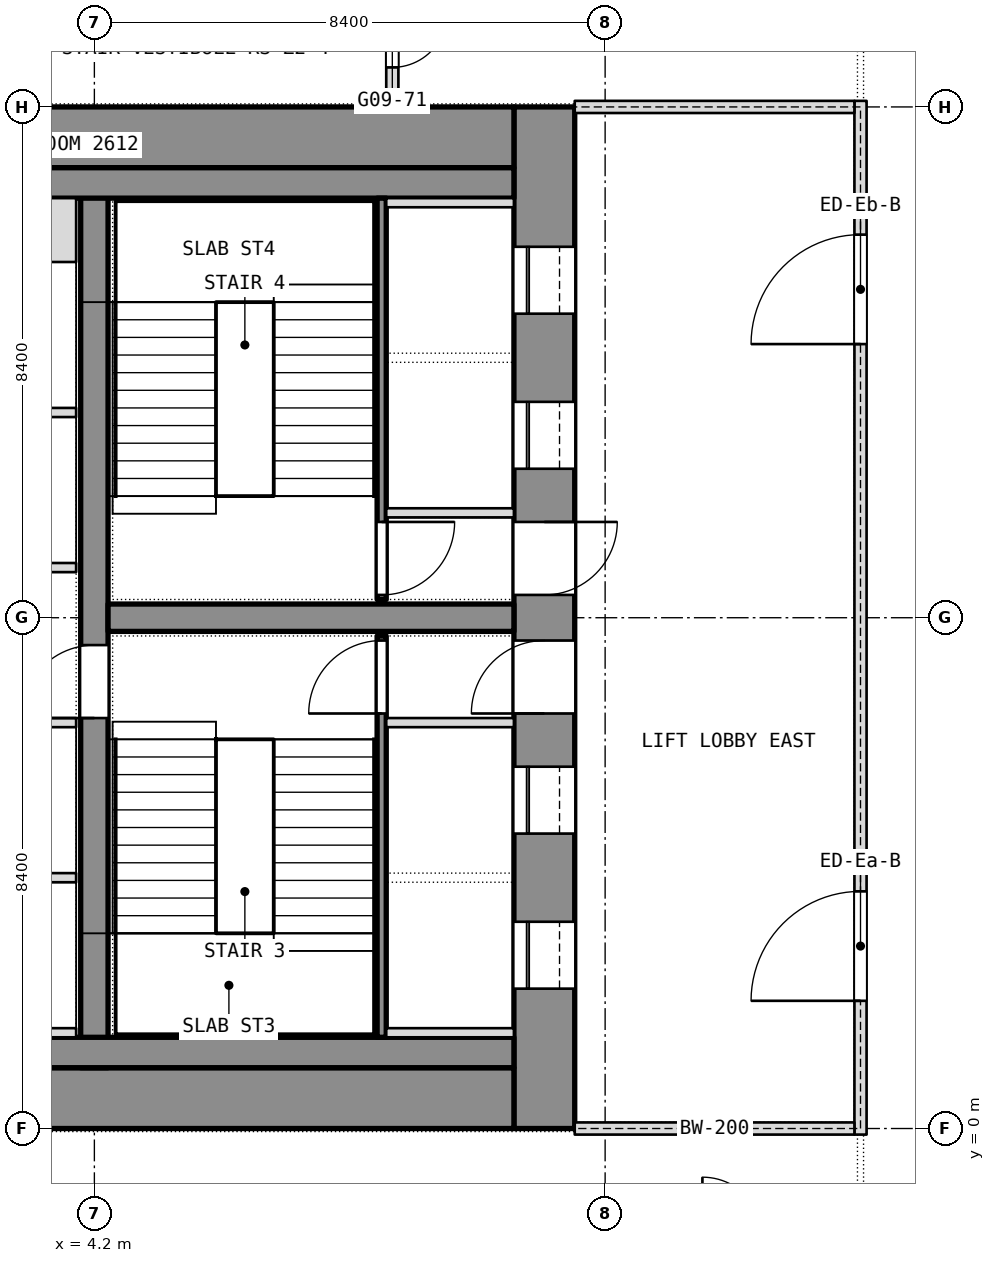
"""IFC4 building model, lengths in metres.
Left out: names, types, materials, properties, quantities, classifications, styles, units other than length and angle.
Written with IfcOpenShell. Run it as: python <this file> out.ifc"""

import sys

from ifc_helpers import new_model, si_unit, direction, frame, frame_2d, origin, place, context, subcontext, project, spatial, rectangle, extrude, element, fill, save


model = new_model("IFC4")
c1 = context("Model", 3, precision=1e-05, world=origin(), true_north=direction((0.0, 1.0)))
c2 = subcontext(c1, "Body", "Model", "MODEL_VIEW")
j1 = project(units=[si_unit("LENGTHUNIT", "METRE"), si_unit("PLANEANGLEUNIT", "RADIAN")], contexts=[c1])
p1 = place(None, origin())
s1 = spatial("IfcSite", under=j1, at=p1, CompositionType="ELEMENT")
p2 = place(p1, origin())
s2 = spatial("IfcBuilding", under=s1, at=p2, CompositionType="ELEMENT")
p3 = place(p2, frame((0.0, 0.0, 119.3)))
s3 = spatial("IfcBuildingStorey", under=s2, at=p3, CompositionType="ELEMENT", Elevation=119.3)
p4 = place(p3, frame((11.6, 0.0, 0.0), z_axis=(0.0, 0.0, 1.0), x_axis=(0.0, 1.0, 0.0)))
e1 = element("IfcWall", 1, at=p4, inside=s3, PredefinedType="SHEAR", context=c2, shape_type="SweptSolid", body=[
    extrude(rectangle(XDim=16.8, YDim=1.0, at=frame_2d((8.4, 0.0))), origin(), (0.0, 0.0, 1.0), 3.6),
])
p5 = place(p4, frame((2.3, 0.0, 0.0)))
e2 = element("IfcOpeningElement", 2, at=p5, cuts=e1, PredefinedType="OPENING", context=c2, shape_type="SweptSolid", body=[
    extrude(rectangle(XDim=1.1, YDim=2.1, at=frame_2d((0.55, 1.05))), frame((0.0, 0.5, 0.0), z_axis=(0.0, -1.0, 0.0), x_axis=(1.0, 0.0, 0.0)), (0.0, 0.0, 1.0), 1.0),
])
p6 = place(p4, frame((4.85, 0.0, 0.0)))
e3 = element("IfcOpeningElement", 3, at=p6, cuts=e1, PredefinedType="OPENING", context=c2, shape_type="SweptSolid", body=[
    extrude(rectangle(XDim=1.1, YDim=2.1, at=frame_2d((0.55, 1.05))), frame((0.0, 0.5, 0.0), z_axis=(0.0, -1.0, 0.0), x_axis=(1.0, 0.0, 0.0)), (0.0, 0.0, 1.0), 1.0),
])
p7 = place(p4, frame((6.825, 0.0, 0.0)))
e4 = element("IfcOpeningElement", 4, at=p7, cuts=e1, PredefinedType="OPENING", context=c2, shape_type="SweptSolid", body=[
    extrude(rectangle(XDim=1.2, YDim=2.1, at=frame_2d((0.6, 1.05))), frame((0.0, 0.5, 0.0), z_axis=(0.0, -1.0, 0.0), x_axis=(1.0, 0.0, 0.0)), (0.0, 0.0, 1.0), 1.0),
])
p8 = place(p4, frame((13.4, 0.0, 0.0)))
e5 = element("IfcOpeningElement", 5, at=p8, cuts=e1, PredefinedType="OPENING", context=c2, shape_type="SweptSolid", body=[
    extrude(rectangle(XDim=1.1, YDim=2.1, at=frame_2d((0.55, 1.05))), frame((0.0, 0.5, 0.0), z_axis=(0.0, -1.0, 0.0), x_axis=(1.0, 0.0, 0.0)), (0.0, 0.0, 1.0), 1.0),
])
p9 = place(p4, frame((10.85, 0.0, 0.0)))
e6 = element("IfcOpeningElement", 6, at=p9, cuts=e1, PredefinedType="OPENING", context=c2, shape_type="SweptSolid", body=[
    extrude(rectangle(XDim=1.1, YDim=2.1, at=frame_2d((0.55, 1.05))), frame((0.0, 0.5, 0.0), z_axis=(0.0, -1.0, 0.0), x_axis=(1.0, 0.0, 0.0)), (0.0, 0.0, 1.0), 1.0),
])
p10 = place(p4, frame((8.775, 0.0, 0.0)))
e7 = element("IfcOpeningElement", 7, at=p10, cuts=e1, PredefinedType="OPENING", context=c2, shape_type="SweptSolid", body=[
    extrude(rectangle(XDim=1.2, YDim=2.1, at=frame_2d((0.6, 1.05))), frame((0.0, 0.5, 0.0), z_axis=(0.0, -1.0, 0.0), x_axis=(1.0, 0.0, 0.0)), (0.0, 0.0, 1.0), 1.0),
])
for number, where, z_axis, x_axis in (
    (8, (-11.1, 0.5, 0.0), (0.0, 0.0, 1.0), (1.0, 0.0, 0.0)),
    (9, (-11.1, 16.3, 0.0), (0.0, 0.0, 1.0), (1.0, 0.0, 0.0)),
):
    element("IfcWall", number, at=place(p3, frame(where, z_axis=z_axis, x_axis=x_axis)), inside=s3, PredefinedType="SHEAR", context=c2, shape_type="SweptSolid", body=[
        extrude(rectangle(XDim=22.2, YDim=1.0, at=frame_2d((11.1, 0.0))), origin(), (0.0, 0.0, 1.0), 3.6),
    ])
p11 = place(p3, frame((4.2, 1.0, 0.0), z_axis=(0.0, 0.0, 1.0), x_axis=(0.0, 1.0, 0.0)))
e10 = element("IfcWall", 10, at=p11, inside=s3, PredefinedType="SHEAR", context=c2, shape_type="SweptSolid", body=[
    extrude(rectangle(XDim=14.8, YDim=0.45, at=frame_2d((7.4, 0.0))), origin(), (0.0, 0.0, 1.0), 3.6),
])
p12 = place(p11, frame((5.75, 0.0, 0.0)))
e11 = element("IfcOpeningElement", 11, at=p12, cuts=e10, PredefinedType="OPENING", context=c2, shape_type="SweptSolid", body=[
    extrude(rectangle(XDim=1.2, YDim=2.1, at=frame_2d((0.6, 1.05))), frame((0.0, 0.225, 0.0), z_axis=(0.0, -1.0, 0.0), x_axis=(1.0, 0.0, 0.0)), (0.0, 0.0, 1.0), 0.45),
])
p13 = place(p3, frame((4.425, 8.4, 0.0), z_axis=(0.0, 0.0, 1.0), x_axis=(1.0, 0.0, 0.0)))
e12 = element("IfcWall", 12, at=p13, inside=s3, PredefinedType="SHEAR", context=c2, shape_type="SweptSolid", body=[
    extrude(rectangle(XDim=6.675, YDim=0.45, at=frame_2d((3.337, 0.0))), origin(), (0.0, 0.0, 1.0), 3.6),
])
p14 = place(p3, frame((9.1, 16.9, 0.0), z_axis=(0.0, 0.0, 1.0), x_axis=(0.0, 1.0, 0.0)))
e13 = element("IfcWall", 13, at=p14, inside=s3, PredefinedType="PARTITIONING", context=c2, shape_type="SweptSolid", body=[
    extrude(rectangle(XDim=1.8, YDim=0.2, at=frame_2d((0.9, 0.0))), origin(), (0.0, 0.0, 1.0), 3.34),
])
p15 = place(p14, frame((0.55, 0.0, 0.0)))
e14 = element("IfcOpeningElement", 14, at=p15, cuts=e13, PredefinedType="OPENING", context=c2, shape_type="SweptSolid", body=[
    extrude(rectangle(XDim=0.9, YDim=2.1, at=frame_2d((0.45, 1.05))), frame((0.0, 0.1, 0.0), z_axis=(0.0, -1.0, 0.0), x_axis=(1.0, 0.0, 0.0)), (0.0, 0.0, 1.0), 0.2),
])
for number, where, z_axis, x_axis in (
    (15, (-11.1, 1.25, 0.0), (0.0, 0.0, 1.0), (1.0, 0.0, 0.0)),
    (16, (-11.1, 15.55, 0.0), (0.0, 0.0, 1.0), (1.0, 0.0, 0.0)),
):
    element("IfcWall", number, at=place(p3, frame(where, z_axis=z_axis, x_axis=x_axis)), inside=s3, PredefinedType="PARTITIONING", context=c2, shape_type="SweptSolid", body=[
        extrude(rectangle(XDim=22.2, YDim=0.5, at=frame_2d((11.1, 0.0))), origin(), (0.0, 0.0, 1.0), 3.34),
    ])
p16 = place(p3, frame((8.925, 1.5, 0.0), z_axis=(0.0, 0.0, 1.0), x_axis=(0.0, 1.0, 0.0)))
e17 = element("IfcWall", 17, at=p16, inside=s3, PredefinedType="SHEAR", context=c2, shape_type="SweptSolid", body=[
    extrude(rectangle(XDim=6.6, YDim=0.15, at=frame_2d((3.3, 0.0))), origin(), (0.0, 0.0, 1.0), 3.34),
])
p17 = place(p16, frame((5.325, 0.0, 0.0)))
e18 = element("IfcOpeningElement", 18, at=p17, cuts=e17, PredefinedType="OPENING", context=c2, shape_type="SweptSolid", body=[
    extrude(rectangle(XDim=1.2, YDim=2.1, at=frame_2d((0.6, 1.05))), frame((0.0, 0.075, 0.0), z_axis=(0.0, -1.0, 0.0), x_axis=(1.0, 0.0, 0.0)), (0.0, 0.0, 1.0), 0.15),
])
for number, where, z_axis, x_axis in (
    (19, (9.0, 6.675, 0.0), (0.0, 0.0, 1.0), (1.0, 0.0, 0.0)),
    (20, (9.0, 1.575, 0.0), (0.0, 0.0, 1.0), (1.0, 0.0, 0.0)),
):
    element("IfcWall", number, at=place(p3, frame(where, z_axis=z_axis, x_axis=x_axis)), inside=s3, PredefinedType="SHEAR", context=c2, shape_type="SweptSolid", body=[
        extrude(rectangle(XDim=2.1, YDim=0.15, at=frame_2d((1.05, 0.0))), origin(), (0.0, 0.0, 1.0), 3.6),
    ])
p18 = place(p3, frame((8.925, 8.7, 0.0), z_axis=(0.0, 0.0, 1.0), x_axis=(0.0, 1.0, 0.0)))
e21 = element("IfcWall", 21, at=p18, inside=s3, PredefinedType="SHEAR", context=c2, shape_type="SweptSolid", body=[
    extrude(rectangle(XDim=6.6, YDim=0.15, at=frame_2d((3.3, 0.0))), origin(), (0.0, 0.0, 1.0), 3.34),
])
p19 = place(p18, frame((0.075, 0.0, 0.0)))
e22 = element("IfcOpeningElement", 22, at=p19, cuts=e21, PredefinedType="OPENING", context=c2, shape_type="SweptSolid", body=[
    extrude(rectangle(XDim=1.2, YDim=2.1, at=frame_2d((0.6, 1.05))), frame((0.0, 0.075, 0.0), z_axis=(0.0, -1.0, 0.0), x_axis=(1.0, 0.0, 0.0)), (0.0, 0.0, 1.0), 0.15),
])
for number, where, z_axis, x_axis in (
    (23, (9.0, 10.125, 0.0), (0.0, 0.0, 1.0), (1.0, 0.0, 0.0)),
    (24, (9.0, 15.225, 0.0), (0.0, 0.0, 1.0), (1.0, 0.0, 0.0)),
):
    element("IfcWall", number, at=place(p3, frame(where, z_axis=z_axis, x_axis=x_axis)), inside=s3, PredefinedType="SHEAR", context=c2, shape_type="SweptSolid", body=[
        extrude(rectangle(XDim=2.1, YDim=0.15, at=frame_2d((1.05, 0.0))), origin(), (0.0, 0.0, 1.0), 3.6),
    ])
p20 = place(p3, frame((-3.9, 4.125, 0.0), z_axis=(0.0, 0.0, 1.0), x_axis=(1.0, 0.0, 0.0)))
e25 = element("IfcWall", 25, at=p20, inside=s3, PredefinedType="PARTITIONING", context=c2, shape_type="SweptSolid", body=[
    extrude(rectangle(XDim=7.8, YDim=0.15, at=frame_2d((3.9, 0.0))), origin(), (0.0, 0.0, 1.0), 3.34),
])
p21 = place(p20, frame((3.75, 0.0, 0.0)))
e26 = element("IfcOpeningElement", 26, at=p21, cuts=e25, PredefinedType="OPENING", context=c2, shape_type="SweptSolid", body=[
    extrude(rectangle(XDim=1.2, YDim=2.1, at=frame_2d((0.6, 1.05))), frame((0.0, 0.075, 0.0), z_axis=(0.0, -1.0, 0.0), x_axis=(1.0, 0.0, 0.0)), (0.0, 0.0, 1.0), 0.15),
])
p22 = place(p3, frame((-3.9, 11.775, 0.0), z_axis=(0.0, 0.0, 1.0), x_axis=(1.0, 0.0, 0.0)))
e27 = element("IfcWall", 27, at=p22, inside=s3, PredefinedType="PARTITIONING", context=c2, shape_type="SweptSolid", body=[
    extrude(rectangle(XDim=7.8, YDim=0.15, at=frame_2d((3.9, 0.0))), origin(), (0.0, 0.0, 1.0), 3.34),
])
p23 = place(p22, frame((3.3, 0.0, 0.0)))
e28 = element("IfcOpeningElement", 28, at=p23, cuts=e27, PredefinedType="OPENING", context=c2, shape_type="SweptSolid", body=[
    extrude(rectangle(XDim=1.2, YDim=2.1, at=frame_2d((0.6, 1.05))), frame((0.0, 0.075, 0.0), z_axis=(0.0, -1.0, 0.0), x_axis=(1.0, 0.0, 0.0)), (0.0, 0.0, 1.0), 0.15),
])
p24 = place(p3, frame((1.65, 1.575, 0.0), z_axis=(0.0, 0.0, 1.0), x_axis=(1.0, 0.0, 0.0)))
e29 = element("IfcWall", 29, at=p24, inside=s3, PredefinedType="SHEAR", context=c2, shape_type="SweptSolid", body=[
    extrude(rectangle(XDim=2.25, YDim=0.15, at=frame_2d((1.125, 0.0))), origin(), (0.0, 0.0, 1.0), 3.6),
])
p25 = place(p3, frame((1.65, 14.775, 0.0), z_axis=(0.0, 0.0, 1.0), x_axis=(1.0, 0.0, 0.0)))
e30 = element("IfcWall", 30, at=p25, inside=s3, PredefinedType="SHEAR", context=c2, shape_type="SweptSolid", body=[
    extrude(rectangle(XDim=2.25, YDim=1.05, at=frame_2d((1.125, 0.0))), origin(), (0.0, 0.0, 1.0), 3.6),
])
for number, where, z_axis, x_axis in (
    (31, (1.65, 6.675, 0.0), (0.0, 0.0, 1.0), (1.0, 0.0, 0.0)),
    (32, (1.65, 9.225, 0.0), (0.0, 0.0, 1.0), (1.0, 0.0, 0.0)),
):
    element("IfcWall", number, at=place(p3, frame(where, z_axis=z_axis, x_axis=x_axis)), inside=s3, PredefinedType="SHEAR", context=c2, shape_type="SweptSolid", body=[
        extrude(rectangle(XDim=2.25, YDim=0.15, at=frame_2d((1.125, 0.0))), origin(), (0.0, 0.0, 1.0), 3.6),
    ])
p26 = place(p3, frame((16.8, -0.1, 0.0), z_axis=(0.0, 0.0, 1.0), x_axis=(0.0, 1.0, 0.0)))
e33 = element("IfcWall", 33, at=p26, inside=s3, PredefinedType="PARTITIONING", context=c2, shape_type="SweptSolid", body=[
    extrude(rectangle(XDim=17.0, YDim=0.2, at=frame_2d((8.5, 0.0))), origin(), (0.0, 0.0, 1.0), 3.34),
])
p27 = place(p26, frame((2.2, 0.0, 0.0)))
e34 = element("IfcOpeningElement", 34, at=p27, cuts=e33, PredefinedType="OPENING", context=c2, shape_type="SweptSolid", body=[
    extrude(rectangle(XDim=1.8, YDim=2.1, at=frame_2d((0.9, 1.05))), frame((0.0, 0.1, 0.0), z_axis=(0.0, -1.0, 0.0), x_axis=(1.0, 0.0, 0.0)), (0.0, 0.0, 1.0), 0.2),
])
p28 = place(p26, frame((13.0, 0.0, 0.0)))
e35 = element("IfcOpeningElement", 35, at=p28, cuts=e33, PredefinedType="OPENING", context=c2, shape_type="SweptSolid", body=[
    extrude(rectangle(XDim=1.8, YDim=2.1, at=frame_2d((0.9, 1.05))), frame((0.0, 0.1, 0.0), z_axis=(0.0, -1.0, 0.0), x_axis=(1.0, 0.0, 0.0)), (0.0, 0.0, 1.0), 0.2),
])
for number, where, z_axis, x_axis in (
    (36, (12.1, 0.0, 0.0), (0.0, 0.0, 1.0), (1.0, 0.0, 0.0)),
    (37, (12.1, 16.8, 0.0), (0.0, 0.0, 1.0), (1.0, 0.0, 0.0)),
):
    element("IfcWall", number, at=place(p3, frame(where, z_axis=z_axis, x_axis=x_axis)), inside=s3, PredefinedType="PARTITIONING", context=c2, shape_type="SweptSolid", body=[
        extrude(rectangle(XDim=4.6, YDim=0.2, at=frame_2d((2.3, 0.0))), origin(), (0.0, 0.0, 1.0), 2.89),
    ])
p29 = place(p15, origin())
e38 = element("IfcDoor", 38, at=p29, inside=s3, OperationType="SINGLE_SWING_RIGHT", PredefinedType="DOOR", context=c2, shape_type="SweptSolid", body=[
    extrude(rectangle(XDim=0.9, YDim=2.1, at=frame_2d((0.45, 1.05))), frame((0.0, 0.025, 0.0), z_axis=(0.0, -1.0, 0.0), x_axis=(1.0, 0.0, 0.0)), (0.0, 0.0, 1.0), 0.05),
])
fill(e14, e38)
p30 = place(p5, origin())
e39 = element("IfcDoor", 39, at=p30, inside=s3, OperationType="SLIDING_TO_LEFT", PredefinedType="DOOR", context=c2, shape_type="SweptSolid", body=[
    extrude(rectangle(XDim=1.1, YDim=2.1, at=frame_2d((0.55, 1.05))), frame((0.0, 0.025, 0.0), z_axis=(0.0, -1.0, 0.0), x_axis=(1.0, 0.0, 0.0)), (0.0, 0.0, 1.0), 0.05),
])
fill(e2, e39)
p31 = place(p6, origin())
e40 = element("IfcDoor", 40, at=p31, inside=s3, OperationType="SLIDING_TO_LEFT", PredefinedType="DOOR", context=c2, shape_type="SweptSolid", body=[
    extrude(rectangle(XDim=1.1, YDim=2.1, at=frame_2d((0.55, 1.05))), frame((0.0, 0.025, 0.0), z_axis=(0.0, -1.0, 0.0), x_axis=(1.0, 0.0, 0.0)), (0.0, 0.0, 1.0), 0.05),
])
fill(e3, e40)
p32 = place(p7, origin())
e41 = element("IfcDoor", 41, at=p32, inside=s3, OperationType="SINGLE_SWING_LEFT", PredefinedType="DOOR", context=c2, shape_type="SweptSolid", body=[
    extrude(rectangle(XDim=1.2, YDim=2.1, at=frame_2d((0.6, 1.05))), frame((0.0, 0.025, 0.0), z_axis=(0.0, -1.0, 0.0), x_axis=(1.0, 0.0, 0.0)), (0.0, 0.0, 1.0), 0.05),
])
fill(e4, e41)
p33 = place(p17, origin())
e42 = element("IfcDoor", 42, at=p33, inside=s3, OperationType="SINGLE_SWING_LEFT", PredefinedType="DOOR", context=c2, shape_type="SweptSolid", body=[
    extrude(rectangle(XDim=1.2, YDim=2.1, at=frame_2d((0.6, 1.05))), frame((0.0, 0.025, 0.0), z_axis=(0.0, -1.0, 0.0), x_axis=(1.0, 0.0, 0.0)), (0.0, 0.0, 1.0), 0.05),
])
fill(e18, e42)
p34 = place(p8, origin())
e43 = element("IfcDoor", 43, at=p34, inside=s3, OperationType="SLIDING_TO_LEFT", PredefinedType="DOOR", context=c2, shape_type="SweptSolid", body=[
    extrude(rectangle(XDim=1.1, YDim=2.1, at=frame_2d((0.55, 1.05))), frame((0.0, 0.025, 0.0), z_axis=(0.0, -1.0, 0.0), x_axis=(1.0, 0.0, 0.0)), (0.0, 0.0, 1.0), 0.05),
])
fill(e5, e43)
p35 = place(p9, origin())
e44 = element("IfcDoor", 44, at=p35, inside=s3, OperationType="SLIDING_TO_LEFT", PredefinedType="DOOR", context=c2, shape_type="SweptSolid", body=[
    extrude(rectangle(XDim=1.1, YDim=2.1, at=frame_2d((0.55, 1.05))), frame((0.0, 0.025, 0.0), z_axis=(0.0, -1.0, 0.0), x_axis=(1.0, 0.0, 0.0)), (0.0, 0.0, 1.0), 0.05),
])
fill(e6, e44)
p36 = place(p10, origin())
e45 = element("IfcDoor", 45, at=p36, inside=s3, OperationType="SINGLE_SWING_LEFT", PredefinedType="DOOR", context=c2, shape_type="SweptSolid", body=[
    extrude(rectangle(XDim=1.2, YDim=2.1, at=frame_2d((0.6, 1.05))), frame((0.0, 0.025, 0.0), z_axis=(0.0, -1.0, 0.0), x_axis=(1.0, 0.0, 0.0)), (0.0, 0.0, 1.0), 0.05),
])
fill(e7, e45)
p37 = place(p19, origin())
e46 = element("IfcDoor", 46, at=p37, inside=s3, OperationType="SINGLE_SWING_LEFT", PredefinedType="DOOR", context=c2, shape_type="SweptSolid", body=[
    extrude(rectangle(XDim=1.2, YDim=2.1, at=frame_2d((0.6, 1.05))), frame((0.0, 0.025, 0.0), z_axis=(0.0, -1.0, 0.0), x_axis=(1.0, 0.0, 0.0)), (0.0, 0.0, 1.0), 0.05),
])
fill(e22, e46)
p38 = place(p12, origin())
e47 = element("IfcDoor", 47, at=p38, inside=s3, OperationType="SINGLE_SWING_LEFT", PredefinedType="DOOR", context=c2, shape_type="SweptSolid", body=[
    extrude(rectangle(XDim=1.2, YDim=2.1, at=frame_2d((0.6, 1.05))), frame((0.0, 0.025, 0.0), z_axis=(0.0, -1.0, 0.0), x_axis=(1.0, 0.0, 0.0)), (0.0, 0.0, 1.0), 0.05),
])
fill(e11, e47)
p39 = place(p27, origin())
e48 = element("IfcDoor", 48, at=p39, inside=s3, OperationType="DOUBLE_DOOR_SINGLE_SWING", PredefinedType="DOOR", context=c2, shape_type="SweptSolid", body=[
    extrude(rectangle(XDim=1.8, YDim=2.1, at=frame_2d((0.9, 1.05))), frame((0.0, 0.025, 0.0), z_axis=(0.0, -1.0, 0.0), x_axis=(1.0, 0.0, 0.0)), (0.0, 0.0, 1.0), 0.05),
])
fill(e34, e48)
p40 = place(p28, origin())
e49 = element("IfcDoor", 49, at=p40, inside=s3, OperationType="DOUBLE_DOOR_SINGLE_SWING", PredefinedType="DOOR", context=c2, shape_type="SweptSolid", body=[
    extrude(rectangle(XDim=1.8, YDim=2.1, at=frame_2d((0.9, 1.05))), frame((0.0, 0.025, 0.0), z_axis=(0.0, -1.0, 0.0), x_axis=(1.0, 0.0, 0.0)), (0.0, 0.0, 1.0), 0.05),
])
fill(e35, e49)
save(model, sys.argv[1])
